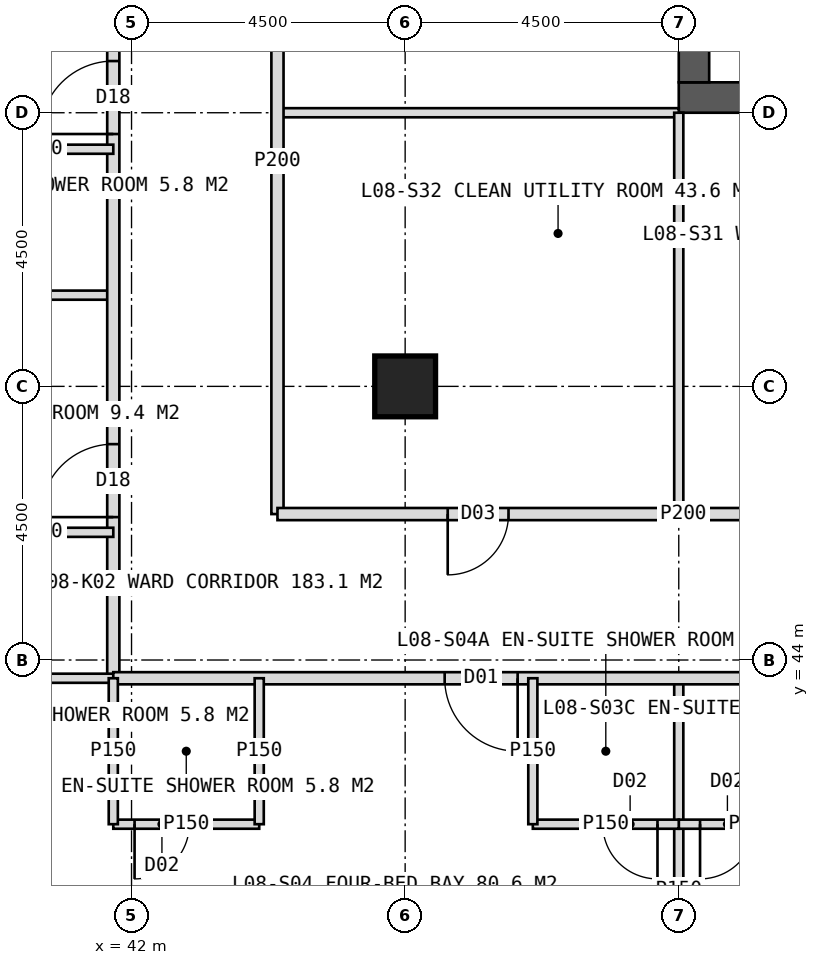
"""IFC4 building model, lengths in metres.
Left out: names, types, materials, properties, quantities, classifications, styles, units other than length and angle.
Written with IfcOpenShell. Run it as: python <this file> out.ifc"""

import sys

from ifc_helpers import new_model, si_unit, direction, frame, frame_2d, origin, origin_2d, place, context, subcontext, project, spatial, rectangle, hollow_rectangle, extrude, element, fill, save


model = new_model("IFC4")
c1 = context("Model", 3, precision=1e-05, world=origin(), true_north=direction((0.0, 1.0)))
c2 = subcontext(c1, "Body", "Model", "MODEL_VIEW")
j1 = project(units=[si_unit("LENGTHUNIT", "METRE"), si_unit("PLANEANGLEUNIT", "RADIAN")], contexts=[c1])
p1 = place(None, origin())
s1 = spatial("IfcSite", under=j1, at=p1, CompositionType="ELEMENT")
p2 = place(p1, origin())
s2 = spatial("IfcBuilding", under=s1, at=p2, CompositionType="ELEMENT")
p3 = place(p2, frame((0.0, 0.0, 39.0)))
s3 = spatial("IfcBuildingStorey", under=s2, at=p3, CompositionType="ELEMENT", Elevation=39.0)
p4 = place(p3, frame((51.0, 53.25, 0.0), z_axis=(0.0, 0.0, 1.0), x_axis=(1.0, 0.0, 0.0)))
e1 = element("IfcWall", 1, at=p4, inside=s3, PredefinedType="SHEAR", context=c2, shape_type="SweptSolid", body=[
    extrude(rectangle(XDim=18.0, YDim=0.5, at=frame_2d((9.0, 0.0))), origin(), (0.0, 0.0, 1.0), 4.0),
])
p5 = place(p4, frame((8.1, 0.0, 0.0)))
e2 = element("IfcOpeningElement", 2, at=p5, cuts=e1, PredefinedType="OPENING", context=c2, shape_type="SweptSolid", body=[
    extrude(rectangle(XDim=1.8, YDim=2.2, at=frame_2d((0.9, 1.1))), frame((0.0, 0.26, 0.0), z_axis=(0.0, -1.0, 0.0), x_axis=(1.0, 0.0, 0.0)), (0.0, 0.0, 1.0), 0.52),
])
p6 = place(p3, frame((51.25, 53.5, 0.0), z_axis=(0.0, 0.0, 1.0), x_axis=(0.0, 1.0, 0.0)))
e3 = element("IfcWall", 3, at=p6, inside=s3, PredefinedType="SHEAR", context=c2, shape_type="SweptSolid", body=[
    extrude(rectangle(XDim=17.0, YDim=0.5, at=frame_2d((8.5, 0.0))), origin(), (0.0, 0.0, 1.0), 4.0),
])
p7 = place(p6, frame((6.0, 0.0, 0.0)))
e4 = element("IfcOpeningElement", 4, at=p7, cuts=e3, PredefinedType="OPENING", context=c2, shape_type="SweptSolid", body=[
    extrude(rectangle(XDim=1.5, YDim=2.2, at=frame_2d((0.75, 1.1))), frame((0.0, 0.26, 0.0), z_axis=(0.0, -1.0, 0.0), x_axis=(1.0, 0.0, 0.0)), (0.0, 0.0, 1.0), 0.52),
])
p8 = place(p3, frame((46.5, 48.5, 0.0), z_axis=(0.0, 0.0, 1.0), x_axis=(1.0, 0.0, 0.0)))
e5 = element("IfcColumn", 5, at=p8, inside=s3, PredefinedType="COLUMN", context=c2, shape_type="SweptSolid", body=[
    extrude(hollow_rectangle(XDim=1.0, YDim=1.0, WallThickness=0.1, at=origin_2d()), origin(), (0.0, 0.0, 1.0), 4.0),
])
p9 = place(p3, frame((41.7, 50.0, 0.0), z_axis=(0.0, 0.0, 1.0), x_axis=(-1.0, 0.0, 0.0)))
e6 = element("IfcWall", 6, at=p9, inside=s3, PredefinedType="PARTITIONING", context=c2, shape_type="SweptSolid", body=[
    extrude(rectangle(XDim=6.975, YDim=0.15, at=frame_2d((3.487, 0.0))), origin(), (0.0, 0.0, 1.0), 3.75),
])
p10 = place(p3, frame((41.7, 43.7, 0.0), z_axis=(0.0, 0.0, 1.0), x_axis=(0.0, 1.0, 0.0)))
e7 = element("IfcWall", 7, at=p10, inside=s3, PredefinedType="PARTITIONING", context=c2, shape_type="SweptSolid", body=[
    extrude(rectangle(XDim=36.6, YDim=0.2, at=frame_2d((18.3, 0.0))), origin(), (0.0, 0.0, 1.0), 3.75),
])
p11 = place(p10, frame((2.65, 0.0, 0.0)))
e8 = element("IfcOpeningElement", 8, at=p11, cuts=e7, PredefinedType="OPENING", context=c2, shape_type="SweptSolid", body=[
    extrude(rectangle(XDim=1.2, YDim=2.2, at=frame_2d((0.6, 1.1))), frame((0.0, 0.11, 0.0), z_axis=(0.0, -1.0, 0.0), x_axis=(1.0, 0.0, 0.0)), (0.0, 0.0, 1.0), 0.22),
])
p12 = place(p10, frame((8.95, 0.0, 0.0)))
e9 = element("IfcOpeningElement", 9, at=p12, cuts=e7, PredefinedType="OPENING", context=c2, shape_type="SweptSolid", body=[
    extrude(rectangle(XDim=1.2, YDim=2.2, at=frame_2d((0.6, 1.1))), frame((0.0, 0.11, 0.0), z_axis=(0.0, -1.0, 0.0), x_axis=(1.0, 0.0, 0.0)), (0.0, 0.0, 1.0), 0.22),
])
p13 = place(p10, frame((14.95, 0.0, 0.0)))
e10 = element("IfcOpeningElement", 10, at=p13, cuts=e7, PredefinedType="OPENING", context=c2, shape_type="SweptSolid", body=[
    extrude(rectangle(XDim=1.2, YDim=2.2, at=frame_2d((0.6, 1.1))), frame((0.0, 0.11, 0.0), z_axis=(0.0, -1.0, 0.0), x_axis=(1.0, 0.0, 0.0)), (0.0, 0.0, 1.0), 0.22),
])
p14 = place(p10, frame((20.95, 0.0, 0.0)))
e11 = element("IfcOpeningElement", 11, at=p14, cuts=e7, PredefinedType="OPENING", context=c2, shape_type="SweptSolid", body=[
    extrude(rectangle(XDim=1.2, YDim=2.2, at=frame_2d((0.6, 1.1))), frame((0.0, 0.11, 0.0), z_axis=(0.0, -1.0, 0.0), x_axis=(1.0, 0.0, 0.0)), (0.0, 0.0, 1.0), 0.22),
])
p15 = place(p10, frame((29.95, 0.0, 0.0)))
e12 = element("IfcOpeningElement", 12, at=p15, cuts=e7, PredefinedType="OPENING", context=c2, shape_type="SweptSolid", body=[
    extrude(rectangle(XDim=1.2, YDim=2.2, at=frame_2d((0.6, 1.1))), frame((0.0, 0.11, 0.0), z_axis=(0.0, -1.0, 0.0), x_axis=(1.0, 0.0, 0.0)), (0.0, 0.0, 1.0), 0.22),
])
p16 = place(p3, frame((41.7, 43.7, 0.0), z_axis=(0.0, 0.0, 1.0), x_axis=(-1.0, 0.0, 0.0)))
e13 = element("IfcWall", 13, at=p16, inside=s3, PredefinedType="PARTITIONING", context=c2, shape_type="SweptSolid", body=[
    extrude(rectangle(XDim=6.975, YDim=0.15, at=frame_2d((3.487, 0.0))), origin(), (0.0, 0.0, 1.0), 3.75),
])
for number, where, z_axis, x_axis in (
    (14, (41.7, 46.1, 0.0), (0.0, 0.0, 1.0), (-1.0, 0.0, 0.0)),
    (15, (41.7, 52.4, 0.0), (0.0, 0.0, 1.0), (-1.0, 0.0, 0.0)),
):
    element("IfcWall", number, at=place(p3, frame(where, z_axis=z_axis, x_axis=x_axis)), inside=s3, PredefinedType="PARTITIONING", context=c2, shape_type="SweptSolid", body=[
        extrude(rectangle(XDim=2.4, YDim=0.15, at=frame_2d((1.2, 0.0))), origin(), (0.0, 0.0, 1.0), 3.75),
    ])
p17 = place(p3, frame((51.0, 53.0, 0.0), z_axis=(0.0, 0.0, 1.0), x_axis=(-1.0, 0.0, 0.0)))
e16 = element("IfcWall", 16, at=p17, inside=s3, PredefinedType="PARTITIONING", context=c2, shape_type="SweptSolid", body=[
    extrude(rectangle(XDim=6.6, YDim=0.15, at=frame_2d((3.3, 0.0))), origin(), (0.0, 0.0, 1.0), 3.75),
])
p18 = place(p3, frame((44.4, 46.4, 0.0), z_axis=(0.0, 0.0, 1.0), x_axis=(0.0, 1.0, 0.0)))
e17 = element("IfcWall", 17, at=p18, inside=s3, PredefinedType="PARTITIONING", context=c2, shape_type="SweptSolid", body=[
    extrude(rectangle(XDim=11.6, YDim=0.2, at=frame_2d((5.8, 0.0))), origin(), (0.0, 0.0, 1.0), 3.75),
])
p19 = place(p18, frame((8.6, 0.0, 0.0)))
e18 = element("IfcOpeningElement", 18, at=p19, cuts=e17, PredefinedType="OPENING", context=c2, shape_type="SweptSolid", body=[
    extrude(rectangle(XDim=1.0, YDim=2.1, at=frame_2d((0.5, 1.05))), frame((0.0, 0.11, 0.0), z_axis=(0.0, -1.0, 0.0), x_axis=(1.0, 0.0, 0.0)), (0.0, 0.0, 1.0), 0.22),
])
p20 = place(p3, frame((51.0, 43.7, 0.0), z_axis=(0.0, 0.0, 1.0), x_axis=(0.0, -1.0, 0.0)))
e19 = element("IfcWall", 19, at=p20, inside=s3, PredefinedType="PARTITIONING", context=c2, shape_type="SweptSolid", body=[
    extrude(rectangle(XDim=6.975, YDim=0.15, at=frame_2d((3.487, 0.0))), origin(), (0.0, 0.0, 1.0), 3.75),
])
p21 = place(p3, frame((78.3, 43.7, 0.0), z_axis=(0.0, 0.0, 1.0), x_axis=(-1.0, 0.0, 0.0)))
e20 = element("IfcWall", 20, at=p21, inside=s3, PredefinedType="PARTITIONING", context=c2, shape_type="SweptSolid", body=[
    extrude(rectangle(XDim=36.6, YDim=0.2, at=frame_2d((18.3, 0.0))), origin(), (0.0, 0.0, 1.0), 3.75),
])
p22 = place(p21, frame((2.65, 0.0, 0.0)))
e21 = element("IfcOpeningElement", 21, at=p22, cuts=e20, PredefinedType="OPENING", context=c2, shape_type="SweptSolid", body=[
    extrude(rectangle(XDim=1.2, YDim=2.2, at=frame_2d((0.6, 1.1))), frame((0.0, 0.11, 0.0), z_axis=(0.0, -1.0, 0.0), x_axis=(1.0, 0.0, 0.0)), (0.0, 0.0, 1.0), 0.22),
])
p23 = place(p21, frame((11.95, 0.0, 0.0)))
e22 = element("IfcOpeningElement", 22, at=p23, cuts=e20, PredefinedType="OPENING", context=c2, shape_type="SweptSolid", body=[
    extrude(rectangle(XDim=1.2, YDim=2.2, at=frame_2d((0.6, 1.1))), frame((0.0, 0.11, 0.0), z_axis=(0.0, -1.0, 0.0), x_axis=(1.0, 0.0, 0.0)), (0.0, 0.0, 1.0), 0.22),
])
p24 = place(p21, frame((20.95, 0.0, 0.0)))
e23 = element("IfcOpeningElement", 23, at=p24, cuts=e20, PredefinedType="OPENING", context=c2, shape_type="SweptSolid", body=[
    extrude(rectangle(XDim=1.2, YDim=2.2, at=frame_2d((0.6, 1.1))), frame((0.0, 0.11, 0.0), z_axis=(0.0, -1.0, 0.0), x_axis=(1.0, 0.0, 0.0)), (0.0, 0.0, 1.0), 0.22),
])
p25 = place(p21, frame((29.95, 0.0, 0.0)))
e24 = element("IfcOpeningElement", 24, at=p25, cuts=e20, PredefinedType="OPENING", context=c2, shape_type="SweptSolid", body=[
    extrude(rectangle(XDim=1.2, YDim=2.2, at=frame_2d((0.6, 1.1))), frame((0.0, 0.11, 0.0), z_axis=(0.0, -1.0, 0.0), x_axis=(1.0, 0.0, 0.0)), (0.0, 0.0, 1.0), 0.22),
])
p26 = place(p3, frame((53.4, 41.3, 0.0), z_axis=(0.0, 0.0, 1.0), x_axis=(-1.0, 0.0, 0.0)))
e25 = element("IfcWall", 25, at=p26, inside=s3, PredefinedType="PARTITIONING", context=c2, shape_type="SweptSolid", body=[
    extrude(rectangle(XDim=2.4, YDim=0.15, at=frame_2d((1.2, 0.0))), origin(), (0.0, 0.0, 1.0), 3.75),
])
p27 = place(p26, frame((1.15, 0.0, 0.0)))
e26 = element("IfcOpeningElement", 26, at=p27, cuts=e25, PredefinedType="OPENING", context=c2, shape_type="SweptSolid", body=[
    extrude(rectangle(XDim=0.9, YDim=2.1, at=frame_2d((0.45, 1.05))), frame((0.0, 0.085, 0.0), z_axis=(0.0, -1.0, 0.0), x_axis=(1.0, 0.0, 0.0)), (0.0, 0.0, 1.0), 0.17),
])
p28 = place(p3, frame((51.0, 41.3, 0.0), z_axis=(0.0, 0.0, 1.0), x_axis=(-1.0, 0.0, 0.0)))
e27 = element("IfcWall", 27, at=p28, inside=s3, PredefinedType="PARTITIONING", context=c2, shape_type="SweptSolid", body=[
    extrude(rectangle(XDim=2.4, YDim=0.15, at=frame_2d((1.2, 0.0))), origin(), (0.0, 0.0, 1.0), 3.75),
])
p29 = place(p28, frame((0.35, 0.0, 0.0)))
e28 = element("IfcOpeningElement", 28, at=p29, cuts=e27, PredefinedType="OPENING", context=c2, shape_type="SweptSolid", body=[
    extrude(rectangle(XDim=0.9, YDim=2.1, at=frame_2d((0.45, 1.05))), frame((0.0, 0.085, 0.0), z_axis=(0.0, -1.0, 0.0), x_axis=(1.0, 0.0, 0.0)), (0.0, 0.0, 1.0), 0.17),
])
p30 = place(p3, frame((48.6, 43.7, 0.0), z_axis=(0.0, 0.0, 1.0), x_axis=(0.0, -1.0, 0.0)))
e29 = element("IfcWall", 29, at=p30, inside=s3, PredefinedType="PARTITIONING", context=c2, shape_type="SweptSolid", body=[
    extrude(rectangle(XDim=2.4, YDim=0.15, at=frame_2d((1.2, 0.0))), origin(), (0.0, 0.0, 1.0), 3.75),
])
p31 = place(p3, frame((44.1, 41.3, 0.0), z_axis=(0.0, 0.0, 1.0), x_axis=(-1.0, 0.0, 0.0)))
e30 = element("IfcWall", 30, at=p31, inside=s3, PredefinedType="PARTITIONING", context=c2, shape_type="SweptSolid", body=[
    extrude(rectangle(XDim=2.4, YDim=0.15, at=frame_2d((1.2, 0.0))), origin(), (0.0, 0.0, 1.0), 2.95),
])
p32 = place(p31, frame((1.15, 0.0, 0.0)))
e31 = element("IfcOpeningElement", 31, at=p32, cuts=e30, PredefinedType="OPENING", context=c2, shape_type="SweptSolid", body=[
    extrude(rectangle(XDim=0.9, YDim=2.1, at=frame_2d((0.45, 1.05))), frame((0.0, 0.085, 0.0), z_axis=(0.0, -1.0, 0.0), x_axis=(1.0, 0.0, 0.0)), (0.0, 0.0, 1.0), 0.17),
])
for number, where, z_axis, x_axis in (
    (32, (44.1, 43.7, 0.0), (0.0, 0.0, 1.0), (0.0, -1.0, 0.0)),
    (33, (41.7, 43.7, 0.0), (0.0, 0.0, 1.0), (0.0, -1.0, 0.0)),
):
    element("IfcWall", number, at=place(p3, frame(where, z_axis=z_axis, x_axis=x_axis)), inside=s3, PredefinedType="PARTITIONING", context=c2, shape_type="SweptSolid", body=[
        extrude(rectangle(XDim=2.4, YDim=0.15, at=frame_2d((1.2, 0.0))), origin(), (0.0, 0.0, 1.0), 3.75),
    ])
p33 = place(p3, frame((57.75, 46.4, 0.0), z_axis=(0.0, 0.0, 1.0), x_axis=(-1.0, 0.0, 0.0)))
e34 = element("IfcWall", 34, at=p33, inside=s3, PredefinedType="PARTITIONING", context=c2, shape_type="SweptSolid", body=[
    extrude(rectangle(XDim=13.35, YDim=0.2, at=frame_2d((6.675, 0.0))), origin(), (0.0, 0.0, 1.0), 3.75),
])
p34 = place(p33, frame((2.875, 0.0, 0.0)))
e35 = element("IfcOpeningElement", 35, at=p34, cuts=e34, PredefinedType="OPENING", context=c2, shape_type="SweptSolid", body=[
    extrude(rectangle(XDim=1.0, YDim=2.1, at=frame_2d((0.5, 1.05))), frame((0.0, 0.11, 0.0), z_axis=(0.0, -1.0, 0.0), x_axis=(1.0, 0.0, 0.0)), (0.0, 0.0, 1.0), 0.22),
])
p35 = place(p33, frame((9.55, 0.0, 0.0)))
e36 = element("IfcOpeningElement", 36, at=p35, cuts=e34, PredefinedType="OPENING", context=c2, shape_type="SweptSolid", body=[
    extrude(rectangle(XDim=1.0, YDim=2.1, at=frame_2d((0.5, 1.05))), frame((0.0, 0.11, 0.0), z_axis=(0.0, -1.0, 0.0), x_axis=(1.0, 0.0, 0.0)), (0.0, 0.0, 1.0), 0.22),
])
p36 = place(p3, frame((51.0, 53.0, 0.0), z_axis=(0.0, 0.0, 1.0), x_axis=(0.0, -1.0, 0.0)))
e37 = element("IfcWall", 37, at=p36, inside=s3, PredefinedType="PARTITIONING", context=c2, shape_type="SweptSolid", body=[
    extrude(rectangle(XDim=6.6, YDim=0.15, at=frame_2d((3.3, 0.0))), origin(), (0.0, 0.0, 1.0), 3.75),
])
p37 = place(p11, origin())
e38 = element("IfcDoor", 38, at=p37, inside=s3, OperationType="SINGLE_SWING_LEFT", PredefinedType="DOOR", context=c2, shape_type="SweptSolid", body=[
    extrude(rectangle(XDim=1.2, YDim=2.2, at=frame_2d((0.6, 1.1))), frame((0.0, 0.025, 0.0), z_axis=(0.0, -1.0, 0.0), x_axis=(1.0, 0.0, 0.0)), (0.0, 0.0, 1.0), 0.05),
])
fill(e8, e38)
p38 = place(p12, origin())
e39 = element("IfcDoor", 39, at=p38, inside=s3, OperationType="SINGLE_SWING_LEFT", PredefinedType="DOOR", context=c2, shape_type="SweptSolid", body=[
    extrude(rectangle(XDim=1.2, YDim=2.2, at=frame_2d((0.6, 1.1))), frame((0.0, 0.025, 0.0), z_axis=(0.0, -1.0, 0.0), x_axis=(1.0, 0.0, 0.0)), (0.0, 0.0, 1.0), 0.05),
])
fill(e9, e39)
p39 = place(p27, origin())
e40 = element("IfcDoor", 40, at=p39, inside=s3, OperationType="SINGLE_SWING_RIGHT", PredefinedType="DOOR", context=c2, shape_type="SweptSolid", body=[
    extrude(rectangle(XDim=0.9, YDim=2.1, at=frame_2d((0.45, 1.05))), frame((0.0, 0.025, 0.0), z_axis=(0.0, -1.0, 0.0), x_axis=(1.0, 0.0, 0.0)), (0.0, 0.0, 1.0), 0.05),
])
fill(e26, e40)
p40 = place(p25, origin())
e41 = element("IfcDoor", 41, at=p40, inside=s3, OperationType="SINGLE_SWING_LEFT", PredefinedType="DOOR", context=c2, shape_type="SweptSolid", body=[
    extrude(rectangle(XDim=1.2, YDim=2.2, at=frame_2d((0.6, 1.1))), frame((0.0, 0.025, 0.0), z_axis=(0.0, -1.0, 0.0), x_axis=(1.0, 0.0, 0.0)), (0.0, 0.0, 1.0), 0.05),
])
fill(e24, e41)
p41 = place(p29, origin())
e42 = element("IfcDoor", 42, at=p41, inside=s3, OperationType="SINGLE_SWING_LEFT", PredefinedType="DOOR", context=c2, shape_type="SweptSolid", body=[
    extrude(rectangle(XDim=0.9, YDim=2.1, at=frame_2d((0.45, 1.05))), frame((0.0, 0.025, 0.0), z_axis=(0.0, -1.0, 0.0), x_axis=(1.0, 0.0, 0.0)), (0.0, 0.0, 1.0), 0.05),
])
fill(e28, e42)
p42 = place(p32, origin())
e43 = element("IfcDoor", 43, at=p42, inside=s3, OperationType="SINGLE_SWING_RIGHT", PredefinedType="DOOR", context=c2, shape_type="SweptSolid", body=[
    extrude(rectangle(XDim=0.9, YDim=2.1, at=frame_2d((0.45, 1.05))), frame((0.0, 0.025, 0.0), z_axis=(0.0, -1.0, 0.0), x_axis=(1.0, 0.0, 0.0)), (0.0, 0.0, 1.0), 0.05),
])
fill(e31, e43)
p43 = place(p35, origin())
e44 = element("IfcDoor", 44, at=p43, inside=s3, OperationType="SINGLE_SWING_RIGHT", PredefinedType="DOOR", context=c2, shape_type="SweptSolid", body=[
    extrude(rectangle(XDim=1.0, YDim=2.1, at=frame_2d((0.5, 1.05))), frame((0.0, 0.025, 0.0), z_axis=(0.0, -1.0, 0.0), x_axis=(1.0, 0.0, 0.0)), (0.0, 0.0, 1.0), 0.05),
])
fill(e36, e44)
save(model, sys.argv[1])
